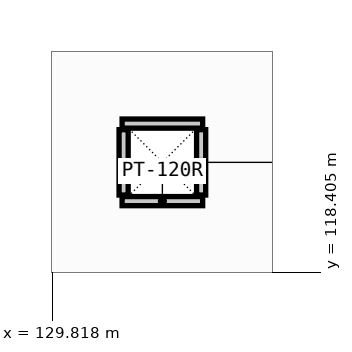
"""IFC4 building model, lengths in metres.
Left out: names, types, materials, properties, quantities, classifications, styles, units other than length and angle.
Written with IfcOpenShell. Run it as: python <this file> out.ifc"""

import sys

from ifc_helpers import new_model, si_unit, direction, frame, frame_2d, origin, place, context, subcontext, project, spatial, rectangle, extrude, element, save


model = new_model("IFC4")
c1 = context("Model", 3, precision=1e-05, world=origin(), true_north=direction((0.0, 1.0)))
c2 = subcontext(c1, "Body", "Model", "MODEL_VIEW")
j1 = project(units=[si_unit("LENGTHUNIT", "METRE"), si_unit("PLANEANGLEUNIT", "RADIAN")], contexts=[c1])
p1 = place(None, origin())
s1 = spatial("IfcSite", under=j1, at=p1, CompositionType="ELEMENT")
p2 = place(p1, origin())
s2 = spatial("IfcBuilding", under=s1, at=p2, CompositionType="ELEMENT")
p3 = place(p2, frame((0.0, 0.0, 4.8)))
s3 = spatial("IfcBuildingStorey", under=s2, at=p3, CompositionType="ELEMENT", Elevation=4.8)
for number, where, z_axis, x_axis in (
    (1, (130.74, 119.34, 0.0), (0.0, 0.0, 1.0), (1.0, 0.0, 0.0)),
    (2, (130.74, 120.36, 0.0), (0.0, 0.0, 1.0), (1.0, 0.0, 0.0)),
):
    element("IfcWall", number, at=place(p3, frame(where, z_axis=z_axis, x_axis=x_axis)), inside=s3, PredefinedType="PARTITIONING", context=c2, shape_type="SweptSolid", body=[
        extrude(rectangle(XDim=1.06, YDim=0.12, at=frame_2d((0.53, 0.0))), origin(), (0.0, 0.0, 1.0), 2.95),
    ])
for number, where, z_axis, x_axis in (
    (3, (130.76, 119.42, 0.0), (0.0, 0.0, 1.0), (0.0, 1.0, 0.0)),
    (4, (131.78, 119.42, 0.0), (0.0, 0.0, 1.0), (0.0, 1.0, 0.0)),
):
    element("IfcWall", number, at=place(p3, frame(where, z_axis=z_axis, x_axis=x_axis)), inside=s3, PredefinedType="PARTITIONING", context=c2, shape_type="SweptSolid", body=[
        extrude(rectangle(XDim=0.86, YDim=0.12, at=frame_2d((0.43, 0.0))), origin(), (0.0, 0.0, 1.0), 2.95),
    ])
save(model, sys.argv[1])
